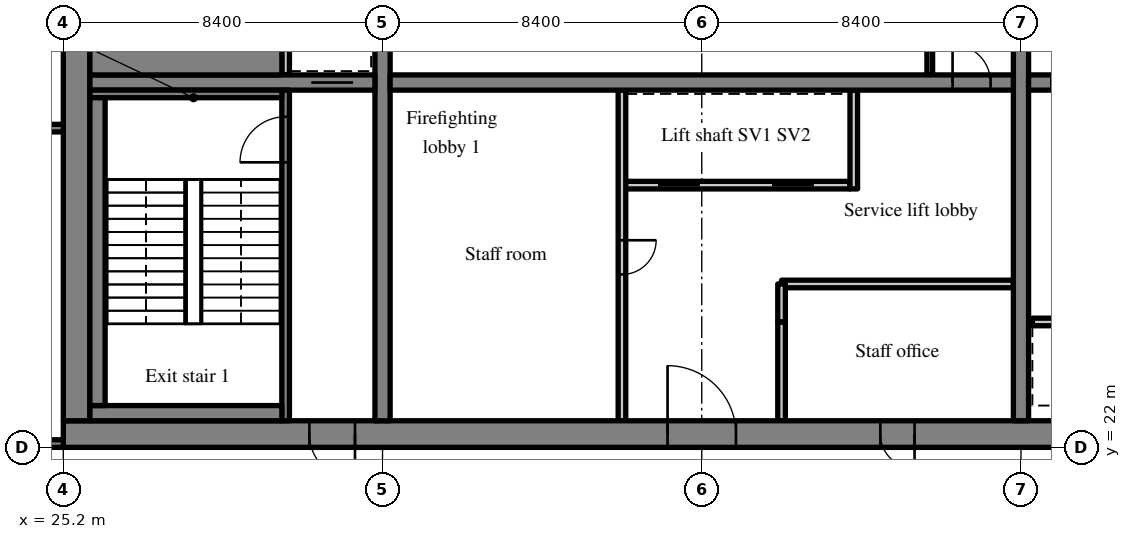
"""IFC4 building model, lengths in metres.
Left out: names, types, materials, properties, quantities, classifications, styles, units other than length and angle.
Written with IfcOpenShell. Run it as: python <this file> out.ifc"""

import sys

from ifc_helpers import new_model, si_unit, direction, frame, frame_2d, origin, place, context, subcontext, project, spatial, rectangle, extrude, source, transform, mapped, element, fill, save


model = new_model("IFC4")
c1 = context("Model", 3, precision=1e-05, world=origin(), true_north=direction((0.0, 1.0)))
c2 = subcontext(c1, "Body", "Model", "MODEL_VIEW")
j1 = project(units=[si_unit("LENGTHUNIT", "METRE"), si_unit("PLANEANGLEUNIT", "RADIAN")], contexts=[c1])
p1 = place(None, origin())
s1 = spatial("IfcSite", under=j1, at=p1, CompositionType="ELEMENT")
p2 = place(p1, origin())
s2 = spatial("IfcBuilding", under=s1, at=p2, CompositionType="ELEMENT")
p3 = place(p2, frame((0.0, 0.0, 197.2)))
s3 = spatial("IfcBuildingStorey", under=s2, at=p3, CompositionType="ELEMENT", Elevation=197.2)
m1 = source(origin(), c2, "Body", "SweptSolid", [
    extrude(rectangle(XDim=50.4, YDim=0.7, at=frame_2d((25.2, 0.0))), origin(), (0.0, 0.0, 1.0), 3.52),
])
p4 = place(p3, frame((25.2, 22.35, 0.0), z_axis=(0.0, 0.0, 1.0), x_axis=(1.0, 0.0, 0.0)))
e1 = element("IfcWall", 1, at=p4, inside=s3, PredefinedType="SHEAR", context=c2, shape_type="MappedRepresentation", body=[
    mapped(m1, transform((0.0, 0.0, 0.0), scale=1.0)),
])
m2 = source(origin(), c2, "Body", "SweptSolid", [
    extrude(rectangle(XDim=1.8, YDim=2.1, at=frame_2d((0.9, 1.05))), frame((0.0, 0.36, 0.0), z_axis=(0.0, -1.0, 0.0), x_axis=(1.0, 0.0, 0.0)), (0.0, 0.0, 1.0), 0.72),
])
p5 = place(p4, frame((15.9, 0.0, 0.0)))
e2 = element("IfcOpeningElement", 2, at=p5, cuts=e1, PredefinedType="OPENING", context=c2, shape_type="MappedRepresentation", body=[
    mapped(m2, transform((0.0, 0.0, 0.0), scale=1.0)),
])
m3 = source(origin(), c2, "Body", "SweptSolid", [
    extrude(rectangle(XDim=0.9, YDim=2.1, at=frame_2d((0.45, 1.05))), frame((0.0, 0.36, 0.0), z_axis=(0.0, -1.0, 0.0), x_axis=(1.0, 0.0, 0.0)), (0.0, 0.0, 1.0), 0.72),
])
p6 = place(p4, frame((21.5, 0.0, 0.0)))
e3 = element("IfcOpeningElement", 3, at=p6, cuts=e1, PredefinedType="OPENING", context=c2, shape_type="MappedRepresentation", body=[
    mapped(m3, transform((0.0, 0.0, 0.0), scale=1.0)),
])
p7 = place(p4, frame((32.7, 0.0, 0.0)))
e4 = element("IfcOpeningElement", 4, at=p7, cuts=e1, PredefinedType="OPENING", context=c2, shape_type="MappedRepresentation", body=[
    mapped(m2, transform((0.0, 0.0, 0.0), scale=1.0)),
])
m4 = source(origin(), c2, "Body", "SweptSolid", [
    extrude(rectangle(XDim=1.2, YDim=2.1, at=frame_2d((0.6, 1.05))), frame((0.0, 0.36, 0.0), z_axis=(0.0, -1.0, 0.0), x_axis=(1.0, 0.0, 0.0)), (0.0, 0.0, 1.0), 0.72),
])
p8 = place(p4, frame((6.475, 0.0, 0.0)))
e5 = element("IfcOpeningElement", 5, at=p8, cuts=e1, PredefinedType="OPENING", context=c2, shape_type="MappedRepresentation", body=[
    mapped(m4, transform((0.0, 0.0, 0.0), scale=1.0)),
])
p9 = place(p4, frame((47.875, 0.0, 0.0)))
e6 = element("IfcOpeningElement", 6, at=p9, cuts=e1, PredefinedType="OPENING", context=c2, shape_type="MappedRepresentation", body=[
    mapped(m4, transform((0.0, 0.0, 0.0), scale=1.0)),
])
m5 = source(origin(), c2, "Body", "SweptSolid", [
    extrude(rectangle(XDim=18.6, YDim=0.7, at=frame_2d((9.3, 0.0))), origin(), (0.0, 0.0, 1.0), 3.52),
])
p10 = place(p3, frame((25.55, 22.7, 0.0), z_axis=(0.0, 0.0, 1.0), x_axis=(0.0, 1.0, 0.0)))
e7 = element("IfcWall", 7, at=p10, inside=s3, PredefinedType="SHEAR", context=c2, shape_type="MappedRepresentation", body=[
    mapped(m5, transform((0.0, 0.0, 0.0), scale=1.0)),
])
m6 = source(origin(), c2, "Body", "SweptSolid", [
    extrude(rectangle(XDim=18.6, YDim=0.4, at=frame_2d((9.3, 0.0))), origin(), (0.0, 0.0, 1.0), 3.52),
])
p11 = place(p3, frame((33.6, 22.7, 0.0), z_axis=(0.0, 0.0, 1.0), x_axis=(0.0, 1.0, 0.0)))
e8 = element("IfcWall", 8, at=p11, inside=s3, PredefinedType="SHEAR", context=c2, shape_type="MappedRepresentation", body=[
    mapped(m6, transform((0.0, 0.0, 0.0), scale=1.0)),
])
m7 = source(origin(), c2, "Body", "SweptSolid", [
    extrude(rectangle(XDim=1.1, YDim=2.1, at=frame_2d((0.55, 1.05))), frame((0.0, 0.21, 0.0), z_axis=(0.0, -1.0, 0.0), x_axis=(1.0, 0.0, 0.0)), (0.0, 0.0, 1.0), 0.42),
])
p12 = place(p11, frame((12.75, 0.0, 0.0)))
e9 = element("IfcOpeningElement", 9, at=p12, cuts=e8, PredefinedType="OPENING", context=c2, shape_type="MappedRepresentation", body=[
    mapped(m7, transform((0.0, 0.0, 0.0), scale=1.0)),
])
p13 = place(p3, frame((50.4, 22.7, 0.0), z_axis=(0.0, 0.0, 1.0), x_axis=(0.0, 1.0, 0.0)))
e10 = element("IfcWall", 10, at=p13, inside=s3, PredefinedType="SHEAR", context=c2, shape_type="MappedRepresentation", body=[
    mapped(m6, transform((0.0, 0.0, 0.0), scale=1.0)),
])
p14 = place(p13, frame((12.75, 0.0, 0.0)))
e11 = element("IfcOpeningElement", 11, at=p14, cuts=e10, PredefinedType="OPENING", context=c2, shape_type="MappedRepresentation", body=[
    mapped(m7, transform((0.0, 0.0, 0.0), scale=1.0)),
])
m8 = source(origin(), c2, "Body", "SweptSolid", [
    extrude(rectangle(XDim=7.5, YDim=0.4, at=frame_2d((3.75, 0.0))), origin(), (0.0, 0.0, 1.0), 3.52),
])
p15 = place(p3, frame((25.9, 31.6, 0.0), z_axis=(0.0, 0.0, 1.0), x_axis=(1.0, 0.0, 0.0)))
e12 = element("IfcWall", 12, at=p15, inside=s3, PredefinedType="SHEAR", context=c2, shape_type="MappedRepresentation", body=[
    mapped(m8, transform((0.0, 0.0, 0.0), scale=1.0)),
])
p16 = place(p15, frame((5.825, 0.0, 0.0)))
e13 = element("IfcOpeningElement", 13, at=p16, cuts=e12, PredefinedType="OPENING", context=c2, shape_type="MappedRepresentation", body=[
    mapped(m7, transform((0.0, 0.0, 0.0), scale=1.0)),
])
m9 = source(origin(), c2, "Body", "SweptSolid", [
    extrude(rectangle(XDim=16.4, YDim=0.4, at=frame_2d((8.2, 0.0))), origin(), (0.0, 0.0, 1.0), 3.52),
])
p17 = place(p3, frame((33.8, 31.6, 0.0), z_axis=(0.0, 0.0, 1.0), x_axis=(1.0, 0.0, 0.0)))
e14 = element("IfcWall", 14, at=p17, inside=s3, PredefinedType="SHEAR", context=c2, shape_type="MappedRepresentation", body=[
    mapped(m9, transform((0.0, 0.0, 0.0), scale=1.0)),
])
m10 = source(origin(), c2, "Body", "SweptSolid", [
    extrude(rectangle(XDim=1.0, YDim=2.1, at=frame_2d((0.5, 1.05))), frame((0.0, 0.21, 0.0), z_axis=(0.0, -1.0, 0.0), x_axis=(1.0, 0.0, 0.0)), (0.0, 0.0, 1.0), 0.42),
])
p18 = place(p17, frame((14.8, 0.0, 0.0)))
e15 = element("IfcOpeningElement", 15, at=p18, cuts=e14, PredefinedType="OPENING", context=c2, shape_type="MappedRepresentation", body=[
    mapped(m10, transform((0.0, 0.0, 0.0), scale=1.0)),
])
p19 = place(p3, frame((50.6, 31.6, 0.0), z_axis=(0.0, 0.0, 1.0), x_axis=(1.0, 0.0, 0.0)))
e16 = element("IfcWall", 16, at=p19, inside=s3, PredefinedType="SHEAR", context=c2, shape_type="MappedRepresentation", body=[
    mapped(m9, transform((0.0, 0.0, 0.0), scale=1.0)),
])
p20 = place(p19, frame((0.6, 0.0, 0.0)))
e17 = element("IfcOpeningElement", 17, at=p20, cuts=e16, PredefinedType="OPENING", context=c2, shape_type="MappedRepresentation", body=[
    mapped(m10, transform((0.0, 0.0, 0.0), scale=1.0)),
])
m11 = source(origin(), c2, "Body", "SweptSolid", [
    extrude(rectangle(XDim=6.0, YDim=0.2, at=frame_2d((3.0, 0.0))), origin(), (0.0, 0.0, 1.0), 3.52),
])
p21 = place(p3, frame((39.9, 28.9, 0.0), z_axis=(0.0, 0.0, 1.0), x_axis=(1.0, 0.0, 0.0)))
e18 = element("IfcWall", 18, at=p21, inside=s3, PredefinedType="SOLIDWALL", context=c2, shape_type="MappedRepresentation", body=[
    mapped(m11, transform((0.0, 0.0, 0.0), scale=1.0)),
])
m12 = source(origin(), c2, "Body", "SweptSolid", [
    extrude(rectangle(XDim=1.1, YDim=2.1, at=frame_2d((0.55, 1.05))), frame((0.0, 0.11, 0.0), z_axis=(0.0, -1.0, 0.0), x_axis=(1.0, 0.0, 0.0)), (0.0, 0.0, 1.0), 0.22),
])
p22 = place(p21, frame((0.95, 0.0, 0.0)))
e19 = element("IfcOpeningElement", 19, at=p22, cuts=e18, PredefinedType="OPENING", context=c2, shape_type="MappedRepresentation", body=[
    mapped(m12, transform((0.0, 0.0, 0.0), scale=1.0)),
])
p23 = place(p21, frame((3.95, 0.0, 0.0)))
e20 = element("IfcOpeningElement", 20, at=p23, cuts=e18, PredefinedType="OPENING", context=c2, shape_type="MappedRepresentation", body=[
    mapped(m12, transform((0.0, 0.0, 0.0), scale=1.0)),
])
m13 = source(origin(), c2, "Body", "SweptSolid", [
    extrude(rectangle(XDim=8.7, YDim=0.2, at=frame_2d((4.35, 0.0))), origin(), (0.0, 0.0, 1.0), 3.52),
])
p24 = place(p3, frame((39.9, 22.7, 0.0), z_axis=(0.0, 0.0, 1.0), x_axis=(0.0, 1.0, 0.0)))
e21 = element("IfcWall", 21, at=p24, inside=s3, PredefinedType="PARTITIONING", context=c2, shape_type="MappedRepresentation", body=[
    mapped(m13, transform((0.0, 0.0, 0.0), scale=1.0)),
])
m14 = source(origin(), c2, "Body", "SweptSolid", [
    extrude(rectangle(XDim=0.9, YDim=2.1, at=frame_2d((0.45, 1.05))), frame((0.0, 0.11, 0.0), z_axis=(0.0, -1.0, 0.0), x_axis=(1.0, 0.0, 0.0)), (0.0, 0.0, 1.0), 0.22),
])
p25 = place(p24, frame((3.85, 0.0, 0.0)))
e22 = element("IfcOpeningElement", 22, at=p25, cuts=e21, PredefinedType="OPENING", context=c2, shape_type="MappedRepresentation", body=[
    mapped(m14, transform((0.0, 0.0, 0.0), scale=1.0)),
])
m15 = source(origin(), c2, "Body", "SweptSolid", [
    extrude(rectangle(XDim=2.6, YDim=0.2, at=frame_2d((1.3, 0.0))), origin(), (0.0, 0.0, 1.0), 3.52),
])
p26 = place(p3, frame((44.1, 22.7, 0.0), z_axis=(0.0, 0.0, 1.0), x_axis=(0.0, 1.0, 0.0)))
e23 = element("IfcWall", 23, at=p26, inside=s3, PredefinedType="PARTITIONING", context=c2, shape_type="MappedRepresentation", body=[
    mapped(m15, transform((0.0, 0.0, 0.0), scale=1.0)),
])
m16 = source(origin(), c2, "Body", "SweptSolid", [
    extrude(rectangle(XDim=2.6, YDim=0.2, at=frame_2d((1.3, 0.0))), origin(), (0.0, 0.0, 1.0), 3.52),
])
p27 = place(p3, frame((46.0, 28.8, 0.0), z_axis=(0.0, 0.0, 1.0), x_axis=(0.0, 1.0, 0.0)))
e24 = element("IfcWall", 24, at=p27, inside=s3, PredefinedType="SOLIDWALL", context=c2, shape_type="MappedRepresentation", body=[
    mapped(m16, transform((0.0, 0.0, 0.0), scale=1.0)),
])
m17 = source(origin(), c2, "Body", "SweptSolid", [
    extrude(rectangle(XDim=6.1, YDim=0.2, at=frame_2d((3.05, 0.0))), origin(), (0.0, 0.0, 1.0), 3.52),
])
p28 = place(p3, frame((44.1, 26.3, 0.0), z_axis=(0.0, 0.0, 1.0), x_axis=(1.0, 0.0, 0.0)))
e25 = element("IfcWall", 25, at=p28, inside=s3, PredefinedType="PARTITIONING", context=c2, shape_type="MappedRepresentation", body=[
    mapped(m17, transform((0.0, 0.0, 0.0), scale=1.0)),
])
m18 = source(origin(), c2, "Body", "SweptSolid", [
    extrude(rectangle(XDim=1.0, YDim=0.2, at=frame_2d((0.5, 0.0))), origin(), (0.0, 0.0, 1.0), 3.52),
])
p29 = place(p3, frame((44.1, 25.3, 0.0), z_axis=(0.0, 0.0, 1.0), x_axis=(0.0, 1.0, 0.0)))
e26 = element("IfcWall", 26, at=p29, inside=s3, PredefinedType="PARTITIONING", context=c2, shape_type="MappedRepresentation", body=[
    mapped(m18, transform((0.0, 0.0, 0.0), scale=1.0)),
])
m19 = source(origin(), c2, "Body", "SweptSolid", [
    extrude(rectangle(XDim=3.2, YDim=0.15, at=frame_2d((1.6, 0.0))), origin(), (0.0, 0.0, 1.0), 3.52),
])
p30 = place(p3, frame((48.0, 31.8, 0.0), z_axis=(0.0, 0.0, 1.0), x_axis=(0.0, 1.0, 0.0)))
e27 = element("IfcWall", 27, at=p30, inside=s3, PredefinedType="PARTITIONING", context=c2, shape_type="MappedRepresentation", body=[
    mapped(m19, transform((0.0, 0.0, 0.0), scale=1.0)),
])
p31 = place(p3, frame((56.7, 25.3, 0.0), z_axis=(0.0, 0.0, 1.0), x_axis=(-1.0, 0.0, 0.0)))
e28 = element("IfcWall", 28, at=p31, inside=s3, PredefinedType="SOLIDWALL", context=c2, shape_type="MappedRepresentation", body=[
    mapped(m11, transform((0.0, 0.0, 0.0), scale=1.0)),
])
p32 = place(p31, frame((0.95, 0.0, 0.0)))
e29 = element("IfcOpeningElement", 29, at=p32, cuts=e28, PredefinedType="OPENING", context=c2, shape_type="MappedRepresentation", body=[
    mapped(m12, transform((0.0, 0.0, 0.0), scale=1.0)),
])
p33 = place(p31, frame((3.95, 0.0, 0.0)))
e30 = element("IfcOpeningElement", 30, at=p33, cuts=e28, PredefinedType="OPENING", context=c2, shape_type="MappedRepresentation", body=[
    mapped(m12, transform((0.0, 0.0, 0.0), scale=1.0)),
])
m20 = source(origin(), c2, "Body", "SweptSolid", [
    extrude(rectangle(XDim=8.7, YDim=0.2, at=frame_2d((4.35, 0.0))), origin(), (0.0, 0.0, 1.0), 3.52),
])
p34 = place(p3, frame((31.05, 22.7, 0.0), z_axis=(0.0, 0.0, 1.0), x_axis=(0.0, 1.0, 0.0)))
e31 = element("IfcWall", 31, at=p34, inside=s3, PredefinedType="SOLIDWALL", context=c2, shape_type="MappedRepresentation", body=[
    mapped(m20, transform((0.0, 0.0, 0.0), scale=1.0)),
])
m21 = source(origin(), c2, "Body", "SweptSolid", [
    extrude(rectangle(XDim=1.2, YDim=2.1, at=frame_2d((0.6, 1.05))), frame((0.0, 0.11, 0.0), z_axis=(0.0, -1.0, 0.0), x_axis=(1.0, 0.0, 0.0)), (0.0, 0.0, 1.0), 0.22),
])
p35 = place(p34, frame((6.8, 0.0, 0.0)))
e32 = element("IfcOpeningElement", 32, at=p35, cuts=e31, PredefinedType="OPENING", context=c2, shape_type="MappedRepresentation", body=[
    mapped(m21, transform((0.0, 0.0, 0.0), scale=1.0)),
])
m22 = source(origin(), c2, "Body", "SweptSolid", [
    extrude(rectangle(XDim=1.8, YDim=0.2, at=frame_2d((0.9, 0.0))), origin(), (0.0, 0.0, 1.0), 3.52),
])
p36 = place(p3, frame((31.05, 31.8, 0.0), z_axis=(0.0, 0.0, 1.0), x_axis=(0.0, 1.0, 0.0)))
e33 = element("IfcWall", 33, at=p36, inside=s3, PredefinedType="SOLIDWALL", context=c2, shape_type="MappedRepresentation", body=[
    mapped(m22, transform((0.0, 0.0, 0.0), scale=1.0)),
])
m23 = source(origin(), c2, "Body", "SweptSolid", [
    extrude(rectangle(XDim=8.25, YDim=0.2, at=frame_2d((4.125, 0.0))), origin(), (0.0, 0.0, 1.0), 3.52),
])
p37 = place(p3, frame((16.95, 22.1, 0.0), z_axis=(0.0, 0.0, 1.0), x_axis=(1.0, 0.0, 0.0)))
e34 = element("IfcWall", 34, at=p37, inside=s3, PredefinedType="SOLIDWALL", context=c2, shape_type="MappedRepresentation", body=[
    mapped(m23, transform((0.0, 0.0, 0.0), scale=1.0)),
])
p38 = place(p37, frame((6.05, 0.0, 0.0)))
e35 = element("IfcOpeningElement", 35, at=p38, cuts=e34, PredefinedType="OPENING", context=c2, shape_type="MappedRepresentation", body=[
    mapped(m21, transform((0.0, 0.0, 0.0), scale=1.0)),
])
p39 = place(p3, frame((16.95, 30.4, 0.0), z_axis=(0.0, 0.0, 1.0), x_axis=(1.0, 0.0, 0.0)))
e36 = element("IfcWall", 36, at=p39, inside=s3, PredefinedType="SOLIDWALL", context=c2, shape_type="MappedRepresentation", body=[
    mapped(m23, transform((0.0, 0.0, 0.0), scale=1.0)),
])
m24 = source(origin(), c2, "Body", "SweptSolid", [
    extrude(rectangle(XDim=1.0, YDim=2.1, at=frame_2d((0.5, 1.05))), frame((0.0, 0.11, 0.0), z_axis=(0.0, -1.0, 0.0), x_axis=(1.0, 0.0, 0.0)), (0.0, 0.0, 1.0), 0.22),
])
p40 = place(p39, frame((6.15, 0.0, 0.0)))
e37 = element("IfcOpeningElement", 37, at=p40, cuts=e36, PredefinedType="OPENING", context=c2, shape_type="MappedRepresentation", body=[
    mapped(m24, transform((0.0, 0.0, 0.0), scale=1.0)),
])
m25 = source(origin(), c2, "Body", "SweptSolid", [
    extrude(rectangle(XDim=5.05, YDim=0.4, at=frame_2d((2.525, 0.0))), origin(), (0.0, 0.0, 1.0), 3.52),
])
p41 = place(p3, frame((25.9, 22.9, 0.0), z_axis=(0.0, 0.0, 1.0), x_axis=(1.0, 0.0, 0.0)))
e38 = element("IfcWall", 38, at=p41, inside=s3, PredefinedType="SOLIDWALL", context=c2, shape_type="MappedRepresentation", body=[
    mapped(m25, transform((0.0, 0.0, 0.0), scale=1.0)),
])
m26 = source(origin(), c2, "Body", "SweptSolid", [
    extrude(rectangle(XDim=5.05, YDim=0.2, at=frame_2d((2.525, 0.0))), origin(), (0.0, 0.0, 1.0), 3.52),
])
p42 = place(p3, frame((25.9, 31.3, 0.0), z_axis=(0.0, 0.0, 1.0), x_axis=(1.0, 0.0, 0.0)))
e39 = element("IfcWall", 39, at=p42, inside=s3, PredefinedType="SOLIDWALL", context=c2, shape_type="MappedRepresentation", body=[
    mapped(m26, transform((0.0, 0.0, 0.0), scale=1.0)),
])
m27 = source(origin(), c2, "Body", "SweptSolid", [
    extrude(rectangle(XDim=8.1, YDim=0.4, at=frame_2d((4.05, 0.0))), origin(), (0.0, 0.0, 1.0), 3.52),
])
p43 = place(p3, frame((26.1, 23.1, 0.0), z_axis=(0.0, 0.0, 1.0), x_axis=(0.0, 1.0, 0.0)))
e40 = element("IfcWall", 40, at=p43, inside=s3, PredefinedType="SOLIDWALL", context=c2, shape_type="MappedRepresentation", body=[
    mapped(m27, transform((0.0, 0.0, 0.0), scale=1.0)),
])
m28 = source(origin(), c2, "Body", "SweptSolid", [
    extrude(rectangle(XDim=5.05, YDim=1.0, at=frame_2d((2.525, 0.0))), origin(), (0.0, 0.0, 1.0), 3.52),
])
p44 = place(p3, frame((25.9, 32.3, 0.0), z_axis=(0.0, 0.0, 1.0), x_axis=(1.0, 0.0, 0.0)))
e41 = element("IfcWall", 41, at=p44, inside=s3, PredefinedType="SOLIDWALL", context=c2, shape_type="MappedRepresentation", body=[
    mapped(m28, transform((0.0, 0.0, 0.0), scale=1.0)),
])
m29 = source(origin(), c2, "Body", "SweptSolid", [
    extrude(rectangle(XDim=1.8, YDim=2.1, at=frame_2d((0.9, 1.05))), frame((0.0, 0.275, 0.0), z_axis=(0.0, -1.0, 0.0), x_axis=(1.0, 0.0, 0.0)), (0.0, 0.0, 1.0), 0.05),
])
p45 = place(p5, origin())
e42 = element("IfcDoor", 42, at=p45, inside=s3, OperationType="DOUBLE_DOOR_SINGLE_SWING", PredefinedType="DOOR", context=c2, shape_type="MappedRepresentation", body=[
    mapped(m29, transform((0.0, 0.0, 0.0), scale=1.0)),
])
fill(e2, e42)
m30 = source(origin(), c2, "Body", "SweptSolid", [
    extrude(rectangle(XDim=1.0, YDim=2.1, at=frame_2d((0.5, 1.05))), frame((0.0, 0.025, 0.0), z_axis=(0.0, -1.0, 0.0), x_axis=(1.0, 0.0, 0.0)), (0.0, 0.0, 1.0), 0.05),
])
p46 = place(p18, origin())
e43 = element("IfcDoor", 43, at=p46, inside=s3, OperationType="SINGLE_SWING_LEFT", PredefinedType="DOOR", context=c2, shape_type="MappedRepresentation", body=[
    mapped(m30, transform((0.0, 0.0, 0.0), scale=1.0)),
])
fill(e15, e43)
m31 = source(origin(), c2, "Body", "SweptSolid", [
    extrude(rectangle(XDim=1.1, YDim=2.1, at=frame_2d((0.55, 1.05))), frame((0.0, 0.025, 0.0), z_axis=(0.0, -1.0, 0.0), x_axis=(1.0, 0.0, 0.0)), (0.0, 0.0, 1.0), 0.05),
])
p47 = place(p22, origin())
e44 = element("IfcDoor", 44, at=p47, inside=s3, OperationType="SLIDING_TO_LEFT", PredefinedType="DOOR", context=c2, shape_type="MappedRepresentation", body=[
    mapped(m31, transform((0.0, 0.0, 0.0), scale=1.0)),
])
fill(e19, e44)
p48 = place(p23, origin())
e45 = element("IfcDoor", 45, at=p48, inside=s3, OperationType="SLIDING_TO_RIGHT", PredefinedType="DOOR", context=c2, shape_type="MappedRepresentation", body=[
    mapped(m31, transform((0.0, 0.0, 0.0), scale=1.0)),
])
fill(e20, e45)
m32 = source(origin(), c2, "Body", "SweptSolid", [
    extrude(rectangle(XDim=0.9, YDim=2.1, at=frame_2d((0.45, 1.05))), frame((0.0, 0.025, 0.0), z_axis=(0.0, -1.0, 0.0), x_axis=(1.0, 0.0, 0.0)), (0.0, 0.0, 1.0), 0.05),
])
p49 = place(p25, origin())
e46 = element("IfcDoor", 46, at=p49, inside=s3, OperationType="SINGLE_SWING_RIGHT", PredefinedType="DOOR", context=c2, shape_type="MappedRepresentation", body=[
    mapped(m32, transform((0.0, 0.0, 0.0), scale=1.0)),
])
fill(e22, e46)
m33 = source(origin(), c2, "Body", "SweptSolid", [
    extrude(rectangle(XDim=0.9, YDim=2.1, at=frame_2d((0.45, 1.05))), frame((0.0, 0.275, 0.0), z_axis=(0.0, -1.0, 0.0), x_axis=(1.0, 0.0, 0.0)), (0.0, 0.0, 1.0), 0.05),
])
p50 = place(p6, origin())
e47 = element("IfcDoor", 47, at=p50, inside=s3, OperationType="SINGLE_SWING_RIGHT", PredefinedType="DOOR", context=c2, shape_type="MappedRepresentation", body=[
    mapped(m33, transform((0.0, 0.0, 0.0), scale=1.0)),
])
fill(e3, e47)
m34 = source(origin(), c2, "Body", "SweptSolid", [
    extrude(rectangle(XDim=1.2, YDim=2.1, at=frame_2d((0.6, 1.05))), frame((0.0, 0.025, 0.0), z_axis=(0.0, -1.0, 0.0), x_axis=(1.0, 0.0, 0.0)), (0.0, 0.0, 1.0), 0.05),
])
p51 = place(p35, origin())
e48 = element("IfcDoor", 48, at=p51, inside=s3, OperationType="SINGLE_SWING_LEFT", PredefinedType="DOOR", context=c2, shape_type="MappedRepresentation", body=[
    mapped(m34, transform((0.0, 0.0, 0.0), scale=1.0)),
])
fill(e32, e48)
m35 = source(origin(), c2, "Body", "SweptSolid", [
    extrude(rectangle(XDim=1.2, YDim=2.1, at=frame_2d((0.6, 1.05))), frame((0.0, 0.275, 0.0), z_axis=(0.0, -1.0, 0.0), x_axis=(1.0, 0.0, 0.0)), (0.0, 0.0, 1.0), 0.05),
])
p52 = place(p8, origin())
e49 = element("IfcDoor", 49, at=p52, inside=s3, OperationType="SINGLE_SWING_RIGHT", PredefinedType="DOOR", context=c2, shape_type="MappedRepresentation", body=[
    mapped(m35, transform((0.0, 0.0, 0.0), scale=1.0)),
])
fill(e5, e49)
p53 = place(p16, origin())
e50 = element("IfcDoor", 50, at=p53, inside=s3, OperationType="SLIDING_TO_RIGHT", PredefinedType="DOOR", context=c2, shape_type="MappedRepresentation", body=[
    mapped(m31, transform((0.0, 0.0, 0.0), scale=1.0)),
])
fill(e13, e50)
save(model, sys.argv[1])
